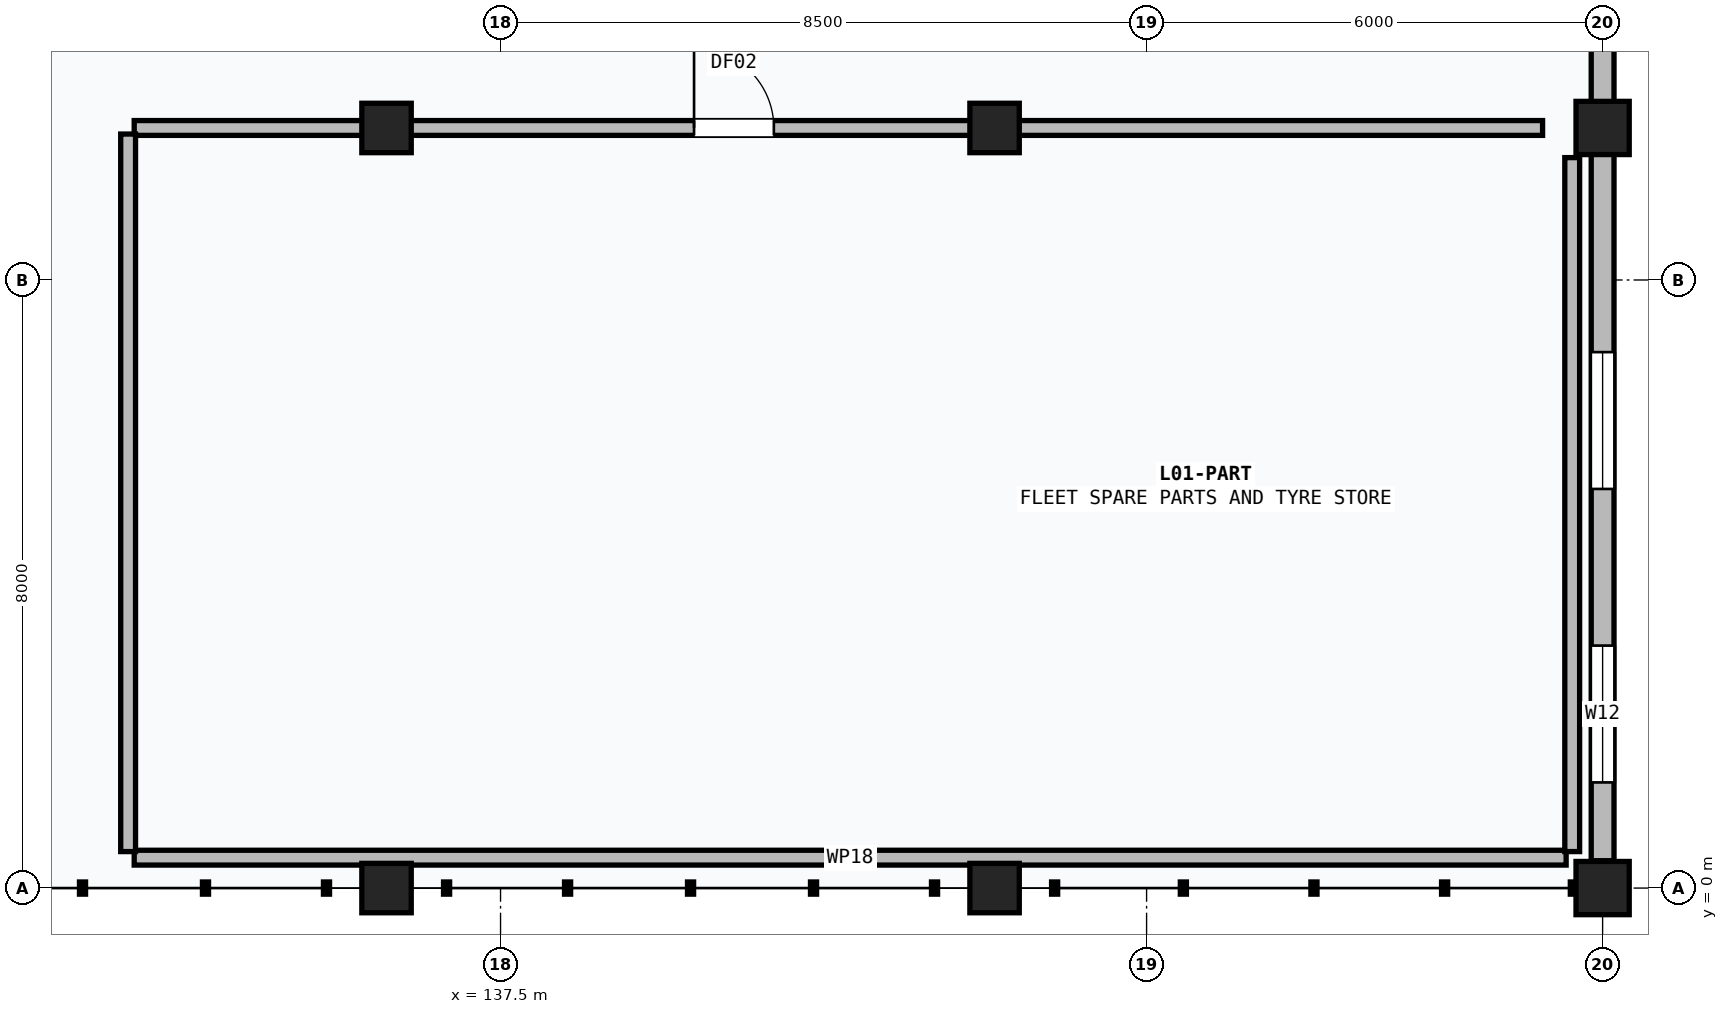
"""IFC4 building model, lengths in metres.
Left out: names, types, materials, properties, quantities, classifications, styles, units other than length and angle.
Written with IfcOpenShell. Run it as: python <this file> out.ifc"""

import sys

from ifc_helpers import new_model, si_unit, direction, frame, frame_2d, origin, origin_2d, place, context, subcontext, project, spatial, rectangle, extrude, element, fill, save


model = new_model("IFC4")
c1 = context("Model", 3, precision=1e-05, world=origin(), true_north=direction((0.0, 1.0)))
c2 = subcontext(c1, "Body", "Model", "MODEL_VIEW")
j1 = project(units=[si_unit("LENGTHUNIT", "METRE"), si_unit("PLANEANGLEUNIT", "RADIAN")], contexts=[c1])
p1 = place(None, origin())
s1 = spatial("IfcSite", under=j1, at=p1, CompositionType="ELEMENT")
p2 = place(p1, origin())
s2 = spatial("IfcBuilding", under=s1, at=p2, CompositionType="ELEMENT")
p3 = place(p2, frame((0.0, 0.0, 4.5)))
s3 = spatial("IfcBuildingStorey", under=s2, at=p3, CompositionType="ELEMENT", Elevation=4.5)
for number, where, z_axis, x_axis in (
    (1, (136.0, 0.0, 0.0), (0.0, 0.0, 1.0), (1.0, 0.0, 0.0)),
    (2, (136.0, 10.0, 0.0), (0.0, 0.0, 1.0), (1.0, 0.0, 0.0)),
    (3, (144.0, 0.0, 0.0), (0.0, 0.0, 1.0), (1.0, 0.0, 0.0)),
    (4, (144.0, 10.0, 0.0), (0.0, 0.0, 1.0), (1.0, 0.0, 0.0)),
):
    element("IfcColumn", number, at=place(p3, frame(where, z_axis=z_axis, x_axis=x_axis)), inside=s3, PredefinedType="COLUMN", context=c2, shape_type="SweptSolid", body=[
        extrude(rectangle(XDim=0.65, YDim=0.65, at=origin_2d()), origin(), (0.0, 0.0, 1.0), 3.9),
    ])
for number, where, z_axis, x_axis in (
    (5, (152.0, 0.0, 0.0), (0.0, 0.0, 1.0), (1.0, 0.0, 0.0)),
    (6, (152.0, 10.0, 0.0), (0.0, 0.0, 1.0), (1.0, 0.0, 0.0)),
):
    element("IfcColumn", number, at=place(p3, frame(where, z_axis=z_axis, x_axis=x_axis)), inside=s3, PredefinedType="COLUMN", context=c2, shape_type="SweptSolid", body=[
        extrude(rectangle(XDim=0.7, YDim=0.7, at=origin_2d()), origin(), (0.0, 0.0, 1.0), 3.9),
    ])
p4 = place(p2, origin())
s4 = spatial("IfcBuildingStorey", under=s2, at=p4, CompositionType="ELEMENT", Elevation=0.0)
p5 = place(p4, frame((152.385, 0.0, 0.0), z_axis=(0.0, 0.0, 1.0), x_axis=(1.0, 0.0, 0.0)))
e7 = element("IfcWall", 7, at=p5, inside=s4, PredefinedType="SOLIDWALL", context=c2, shape_type="SweptSolid", body=[
    extrude(rectangle(XDim=15.23, YDim=0.355, at=frame_2d((7.615, 0.0))), origin(), (0.0, 0.0, 1.0), 7.165),
])
p6 = place(p5, frame((5.015, 0.0, 0.0)))
e8 = element("IfcOpeningElement", 8, at=p6, cuts=e7, PredefinedType="OPENING", context=c2, shape_type="SweptSolid", body=[
    extrude(rectangle(XDim=5.2, YDim=4.2, at=frame_2d((2.6, 2.1))), frame((0.0, 0.188, 0.0), z_axis=(0.0, -1.0, 0.0), x_axis=(1.0, 0.0, 0.0)), (0.0, 0.0, 1.0), 0.375),
])
p7 = place(p5, frame((1.4, 0.0, 5.1)))
e9 = element("IfcOpeningElement", 9, at=p7, cuts=e7, PredefinedType="OPENING", context=c2, shape_type="SweptSolid", body=[
    extrude(rectangle(XDim=2.7, YDim=1.8, at=frame_2d((1.35, 0.9))), frame((0.0, 0.188, 0.0), z_axis=(0.0, -1.0, 0.0), x_axis=(1.0, 0.0, 0.0)), (0.0, 0.0, 1.0), 0.375),
])
p8 = place(p5, frame((11.0, 0.0, 5.1)))
e10 = element("IfcOpeningElement", 10, at=p8, cuts=e7, PredefinedType="OPENING", context=c2, shape_type="SweptSolid", body=[
    extrude(rectangle(XDim=2.7, YDim=1.8, at=frame_2d((1.35, 0.9))), frame((0.0, 0.188, 0.0), z_axis=(0.0, -1.0, 0.0), x_axis=(1.0, 0.0, 0.0)), (0.0, 0.0, 1.0), 0.375),
])
p9 = place(p3, frame((152.0, 0.36, 0.0), z_axis=(0.0, 0.0, 1.0), x_axis=(0.0, 1.0, 0.0)))
e11 = element("IfcWall", 11, at=p9, inside=s3, PredefinedType="SOLIDWALL", context=c2, shape_type="SweptSolid", body=[
    extrude(rectangle(XDim=27.025, YDim=0.3, at=frame_2d((13.512, 0.0))), origin(), (0.0, 0.0, 1.0), 2.695),
])
p10 = place(p9, frame((1.03, 0.0, 0.695)))
e12 = element("IfcOpeningElement", 12, at=p10, cuts=e11, PredefinedType="OPENING", context=c2, shape_type="SweptSolid", body=[
    extrude(rectangle(XDim=1.8, YDim=1.8, at=frame_2d((0.9, 0.9))), frame((0.0, 0.16, 0.0), z_axis=(0.0, -1.0, 0.0), x_axis=(1.0, 0.0, 0.0)), (0.0, 0.0, 1.0), 0.32),
])
p11 = place(p9, frame((4.891, 0.0, 0.695)))
e13 = element("IfcOpeningElement", 13, at=p11, cuts=e11, PredefinedType="OPENING", context=c2, shape_type="SweptSolid", body=[
    extrude(rectangle(XDim=1.8, YDim=1.8, at=frame_2d((0.9, 0.9))), frame((0.0, 0.16, 0.0), z_axis=(0.0, -1.0, 0.0), x_axis=(1.0, 0.0, 0.0)), (0.0, 0.0, 1.0), 0.32),
])
p12 = place(p9, frame((12.613, 0.0, 0.695)))
e14 = element("IfcOpeningElement", 14, at=p12, cuts=e11, PredefinedType="OPENING", context=c2, shape_type="SweptSolid", body=[
    extrude(rectangle(XDim=1.8, YDim=1.8, at=frame_2d((0.9, 0.9))), frame((0.0, 0.16, 0.0), z_axis=(0.0, -1.0, 0.0), x_axis=(1.0, 0.0, 0.0)), (0.0, 0.0, 1.0), 0.32),
])
p13 = place(p9, frame((20.334, 0.0, 0.695)))
e15 = element("IfcOpeningElement", 15, at=p13, cuts=e11, PredefinedType="OPENING", context=c2, shape_type="SweptSolid", body=[
    extrude(rectangle(XDim=1.8, YDim=1.8, at=frame_2d((0.9, 0.9))), frame((0.0, 0.16, 0.0), z_axis=(0.0, -1.0, 0.0), x_axis=(1.0, 0.0, 0.0)), (0.0, 0.0, 1.0), 0.32),
])
p14 = place(p9, frame((24.195, 0.0, 0.695)))
e16 = element("IfcOpeningElement", 16, at=p14, cuts=e11, PredefinedType="OPENING", context=c2, shape_type="SweptSolid", body=[
    extrude(rectangle(XDim=1.8, YDim=1.8, at=frame_2d((0.9, 0.9))), frame((0.0, 0.16, 0.0), z_axis=(0.0, -1.0, 0.0), x_axis=(1.0, 0.0, 0.0)), (0.0, 0.0, 1.0), 0.32),
])
p15 = place(p3, frame((132.68, 0.4, 0.0), z_axis=(0.0, 0.0, 1.0), x_axis=(1.0, 0.0, 0.0)))
e17 = element("IfcWall", 17, at=p15, inside=s3, PredefinedType="PARTITIONING", context=c2, shape_type="SweptSolid", body=[
    extrude(rectangle(XDim=18.84, YDim=0.195, at=frame_2d((9.42, 0.0))), origin(), (0.0, 0.0, 1.0), 3.045),
])
p16 = place(p3, frame((132.68, 10.0, 0.0), z_axis=(0.0, 0.0, 1.0), x_axis=(1.0, 0.0, 0.0)))
e18 = element("IfcWall", 18, at=p16, inside=s3, PredefinedType="PARTITIONING", context=c2, shape_type="SweptSolid", body=[
    extrude(rectangle(XDim=18.53, YDim=0.195, at=frame_2d((9.265, 0.0))), origin(), (0.0, 0.0, 1.0), 2.545),
])
p17 = place(p16, frame((7.366, 0.0, 0.0)))
e19 = element("IfcOpeningElement", 19, at=p17, cuts=e18, PredefinedType="OPENING", context=c2, shape_type="SweptSolid", body=[
    extrude(rectangle(XDim=1.05, YDim=2.15, at=frame_2d((0.525, 1.075))), frame((0.0, 0.107, 0.0), z_axis=(0.0, -1.0, 0.0), x_axis=(1.0, 0.0, 0.0)), (0.0, 0.0, 1.0), 0.215),
])
p18 = place(p3, frame((132.6, 0.48, 0.0), z_axis=(0.0, 0.0, 1.0), x_axis=(0.0, 1.0, 0.0)))
e20 = element("IfcWall", 20, at=p18, inside=s3, PredefinedType="PARTITIONING", context=c2, shape_type="SweptSolid", body=[
    extrude(rectangle(XDim=9.44, YDim=0.195, at=frame_2d((4.72, 0.0))), origin(), (0.0, 0.0, 1.0), 2.545),
])
p19 = place(p3, frame((151.6, 0.48, 0.0), z_axis=(0.0, 0.0, 1.0), x_axis=(0.0, 1.0, 0.0)))
e21 = element("IfcWall", 21, at=p19, inside=s3, PredefinedType="PARTITIONING", context=c2, shape_type="SweptSolid", body=[
    extrude(rectangle(XDim=9.13, YDim=0.195, at=frame_2d((4.565, 0.0))), origin(), (0.0, 0.0, 1.0), 3.645),
])
p20 = place(p10, origin())
e22 = element("IfcWindow", 22, at=p20, inside=s3, PartitioningType="SINGLE_PANEL", PredefinedType="WINDOW", context=c2, shape_type="SweptSolid", body=[
    extrude(rectangle(XDim=1.8, YDim=1.8, at=frame_2d((0.9, 0.9))), frame((0.0, 0.03, 0.0), z_axis=(0.0, -1.0, 0.0), x_axis=(1.0, 0.0, 0.0)), (0.0, 0.0, 1.0), 0.06),
])
fill(e12, e22)
p21 = place(p11, origin())
e23 = element("IfcWindow", 23, at=p21, inside=s3, PartitioningType="SINGLE_PANEL", PredefinedType="WINDOW", context=c2, shape_type="SweptSolid", body=[
    extrude(rectangle(XDim=1.8, YDim=1.8, at=frame_2d((0.9, 0.9))), frame((0.0, 0.03, 0.0), z_axis=(0.0, -1.0, 0.0), x_axis=(1.0, 0.0, 0.0)), (0.0, 0.0, 1.0), 0.06),
])
fill(e13, e23)
p22 = place(p17, origin())
e24 = element("IfcDoor", 24, at=p22, inside=s3, OperationType="SINGLE_SWING_LEFT", PredefinedType="DOOR", context=c2, shape_type="SweptSolid", body=[
    extrude(rectangle(XDim=1.05, YDim=2.15, at=frame_2d((0.525, 1.075))), frame((0.0, 0.025, 0.0), z_axis=(0.0, -1.0, 0.0), x_axis=(1.0, 0.0, 0.0)), (0.0, 0.0, 1.0), 0.05),
])
fill(e19, e24)
save(model, sys.argv[1])
